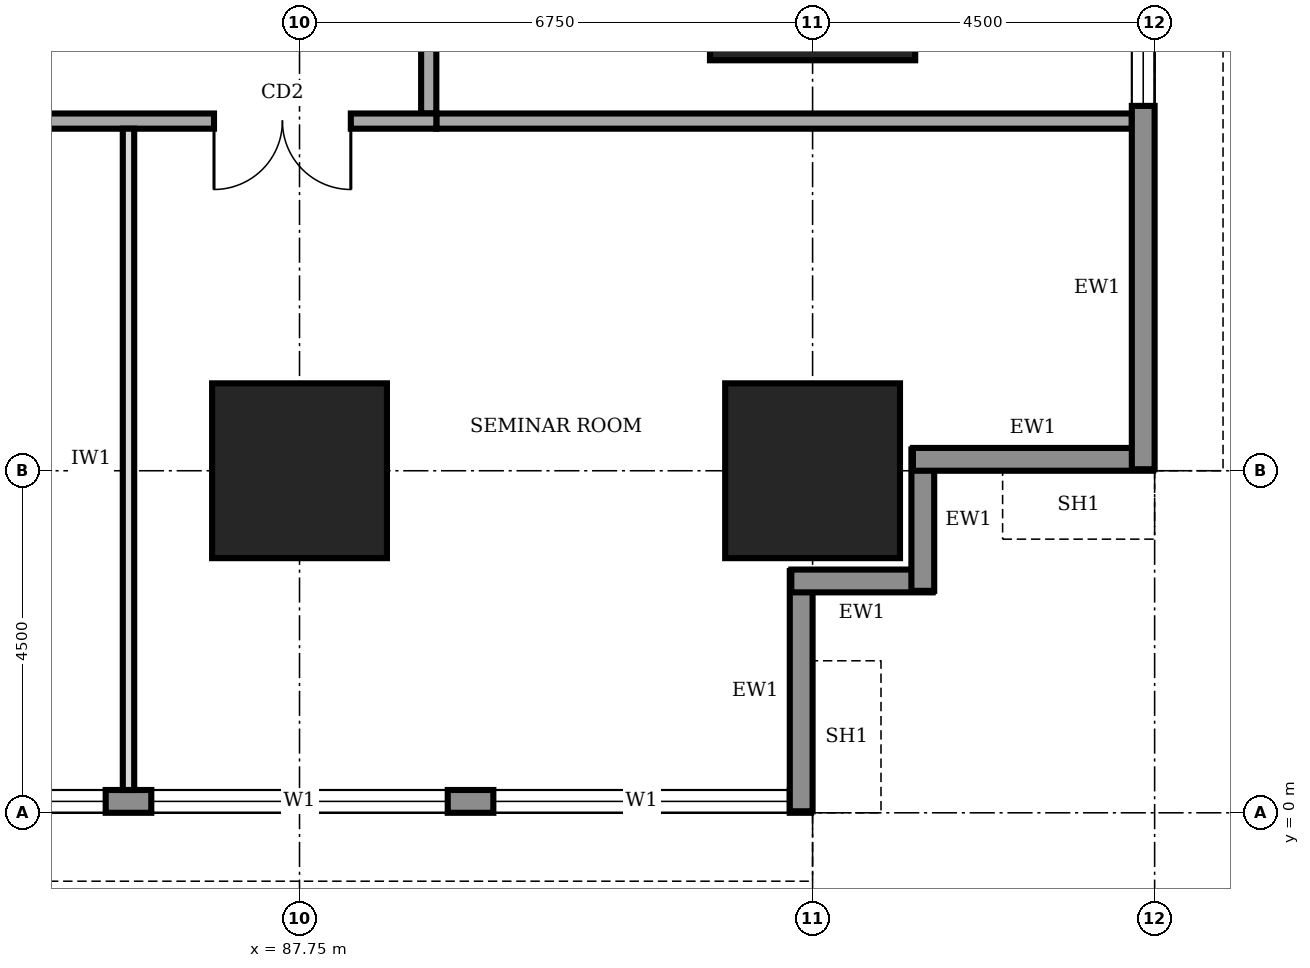
"""IFC4 building model, lengths in metres.
Left out: names, types, materials, properties, quantities, classifications, styles, units other than length and angle.
Written with IfcOpenShell. Run it as: python <this file> out.ifc"""

import sys

from ifc_helpers import new_model, si_unit, direction, frame, frame_2d, origin, origin_2d, place, context, subcontext, project, spatial, rectangle, extrude, element, fill, save


model = new_model("IFC4")
c1 = context("Model", 3, precision=1e-05, world=origin(), true_north=direction((0.0, 1.0)))
c2 = subcontext(c1, "Body", "Model", "MODEL_VIEW")
j1 = project(units=[si_unit("LENGTHUNIT", "METRE"), si_unit("PLANEANGLEUNIT", "RADIAN")], contexts=[c1])
p1 = place(None, origin())
s1 = spatial("IfcSite", under=j1, at=p1, CompositionType="ELEMENT")
p2 = place(p1, origin())
s2 = spatial("IfcBuilding", under=s1, at=p2, CompositionType="ELEMENT")
p3 = place(p2, frame((0.0, 0.0, 29.0)))
s3 = spatial("IfcBuildingStorey", under=s2, at=p3, CompositionType="ELEMENT", Elevation=29.0)
for number, where, z_axis, x_axis in (
    (1, (87.75, 4.5, 0.0), (0.0, 0.0, 1.0), (1.0, 0.0, 0.0)),
    (2, (94.5, 4.5, 0.0), (0.0, 0.0, 1.0), (1.0, 0.0, 0.0)),
):
    element("IfcColumn", number, at=place(p3, frame(where, z_axis=z_axis, x_axis=x_axis)), inside=s3, PredefinedType="COLUMN", context=c2, shape_type="SweptSolid", body=[
        extrude(rectangle(XDim=2.3, YDim=2.3, at=origin_2d()), origin(), (0.0, 0.0, 1.0), 4.0),
    ])
p4 = place(p3, frame((94.5, 11.25, 0.0), z_axis=(0.0, 0.0, 1.0), x_axis=(1.0, 0.0, 0.0)))
e3 = element("IfcColumn", 3, at=p4, inside=s3, PredefinedType="COLUMN", context=c2, shape_type="SweptSolid", body=[
    extrude(rectangle(XDim=2.7, YDim=2.7, at=origin_2d()), origin(), (0.0, 0.0, 1.0), 4.0),
])
p5 = place(p3, frame((67.52, 0.15, 0.0), z_axis=(0.0, 0.0, 1.0), x_axis=(1.0, 0.0, 0.0)))
e4 = element("IfcWall", 4, at=p5, inside=s3, PredefinedType="STANDARD", context=c2, shape_type="SweptSolid", body=[
    extrude(rectangle(XDim=26.96, YDim=0.3, at=frame_2d((13.48, 0.0))), origin(), (0.0, 0.0, 1.0), 3.75),
])
p6 = place(p5, frame((4.78, 0.0, 0.9)))
e5 = element("IfcOpeningElement", 5, at=p6, cuts=e4, PredefinedType="OPENING", context=c2, shape_type="SweptSolid", body=[
    extrude(rectangle(XDim=3.9, YDim=2.2, at=frame_2d((1.95, 1.1))), frame((0.0, 0.16, 0.0), z_axis=(0.0, -1.0, 0.0), x_axis=(1.0, 0.0, 0.0)), (0.0, 0.0, 1.0), 0.32),
])
p7 = place(p5, frame((9.28, 0.0, 0.9)))
e6 = element("IfcOpeningElement", 6, at=p7, cuts=e4, PredefinedType="OPENING", context=c2, shape_type="SweptSolid", body=[
    extrude(rectangle(XDim=3.9, YDim=2.2, at=frame_2d((1.95, 1.1))), frame((0.0, 0.16, 0.0), z_axis=(0.0, -1.0, 0.0), x_axis=(1.0, 0.0, 0.0)), (0.0, 0.0, 1.0), 0.32),
])
p8 = place(p5, frame((13.78, 0.0, 0.9)))
e7 = element("IfcOpeningElement", 7, at=p8, cuts=e4, PredefinedType="OPENING", context=c2, shape_type="SweptSolid", body=[
    extrude(rectangle(XDim=3.9, YDim=2.2, at=frame_2d((1.95, 1.1))), frame((0.0, 0.16, 0.0), z_axis=(0.0, -1.0, 0.0), x_axis=(1.0, 0.0, 0.0)), (0.0, 0.0, 1.0), 0.32),
])
p9 = place(p5, frame((18.28, 0.0, 0.9)))
e8 = element("IfcOpeningElement", 8, at=p9, cuts=e4, PredefinedType="OPENING", context=c2, shape_type="SweptSolid", body=[
    extrude(rectangle(XDim=3.9, YDim=2.2, at=frame_2d((1.95, 1.1))), frame((0.0, 0.16, 0.0), z_axis=(0.0, -1.0, 0.0), x_axis=(1.0, 0.0, 0.0)), (0.0, 0.0, 1.0), 0.32),
])
p10 = place(p5, frame((22.78, 0.0, 0.9)))
e9 = element("IfcOpeningElement", 9, at=p10, cuts=e4, PredefinedType="OPENING", context=c2, shape_type="SweptSolid", body=[
    extrude(rectangle(XDim=3.9, YDim=2.2, at=frame_2d((1.95, 1.1))), frame((0.0, 0.16, 0.0), z_axis=(0.0, -1.0, 0.0), x_axis=(1.0, 0.0, 0.0)), (0.0, 0.0, 1.0), 0.32),
])
p11 = place(p3, frame((94.35, 0.02, 0.0), z_axis=(0.0, 0.0, 1.0), x_axis=(0.0, 1.0, 0.0)))
e10 = element("IfcWall", 10, at=p11, inside=s3, PredefinedType="STANDARD", context=c2, shape_type="SweptSolid", body=[
    extrude(rectangle(XDim=3.16, YDim=0.3, at=frame_2d((1.58, 0.0))), origin(), (0.0, 0.0, 1.0), 2.85),
])
for number, where, z_axis, x_axis in (
    (11, (94.22, 3.05, 0.0), (0.0, 0.0, 1.0), (1.0, 0.0, 0.0)),
    (12, (95.95, 2.92, 0.0), (0.0, 0.0, 1.0), (0.0, 1.0, 0.0)),
):
    element("IfcWall", number, at=place(p3, frame(where, z_axis=z_axis, x_axis=x_axis)), inside=s3, PredefinedType="STANDARD", context=c2, shape_type="SweptSolid", body=[
        extrude(rectangle(XDim=1.86, YDim=0.3, at=frame_2d((0.93, 0.0))), origin(), (0.0, 0.0, 1.0), 3.75),
    ])
p12 = place(p3, frame((95.82, 4.65, 0.0), z_axis=(0.0, 0.0, 1.0), x_axis=(1.0, 0.0, 0.0)))
e13 = element("IfcWall", 13, at=p12, inside=s3, PredefinedType="STANDARD", context=c2, shape_type="SweptSolid", body=[
    extrude(rectangle(XDim=3.16, YDim=0.3, at=frame_2d((1.58, 0.0))), origin(), (0.0, 0.0, 1.0), 2.85),
])
p13 = place(p3, frame((98.85, 4.52, 0.0), z_axis=(0.0, 0.0, 1.0), x_axis=(0.0, 1.0, 0.0)))
e14 = element("IfcWall", 14, at=p13, inside=s3, PredefinedType="STANDARD", context=c2, shape_type="SweptSolid", body=[
    extrude(rectangle(XDim=31.46, YDim=0.3, at=frame_2d((15.73, 0.0))), origin(), (0.0, 0.0, 1.0), 3.75),
])
p14 = place(p13, frame((4.78, 0.0, 0.9)))
e15 = element("IfcOpeningElement", 15, at=p14, cuts=e14, PredefinedType="OPENING", context=c2, shape_type="SweptSolid", body=[
    extrude(rectangle(XDim=3.9, YDim=2.2, at=frame_2d((1.95, 1.1))), frame((0.0, 0.16, 0.0), z_axis=(0.0, -1.0, 0.0), x_axis=(1.0, 0.0, 0.0)), (0.0, 0.0, 1.0), 0.32),
])
p15 = place(p13, frame((9.28, 0.0, 0.9)))
e16 = element("IfcOpeningElement", 16, at=p15, cuts=e14, PredefinedType="OPENING", context=c2, shape_type="SweptSolid", body=[
    extrude(rectangle(XDim=3.9, YDim=2.2, at=frame_2d((1.95, 1.1))), frame((0.0, 0.16, 0.0), z_axis=(0.0, -1.0, 0.0), x_axis=(1.0, 0.0, 0.0)), (0.0, 0.0, 1.0), 0.32),
])
p16 = place(p13, frame((13.78, 0.0, 0.9)))
e17 = element("IfcOpeningElement", 17, at=p16, cuts=e14, PredefinedType="OPENING", context=c2, shape_type="SweptSolid", body=[
    extrude(rectangle(XDim=3.9, YDim=2.2, at=frame_2d((1.95, 1.1))), frame((0.0, 0.16, 0.0), z_axis=(0.0, -1.0, 0.0), x_axis=(1.0, 0.0, 0.0)), (0.0, 0.0, 1.0), 0.32),
])
p17 = place(p13, frame((18.28, 0.0, 0.9)))
e18 = element("IfcOpeningElement", 18, at=p17, cuts=e14, PredefinedType="OPENING", context=c2, shape_type="SweptSolid", body=[
    extrude(rectangle(XDim=3.9, YDim=2.2, at=frame_2d((1.95, 1.1))), frame((0.0, 0.16, 0.0), z_axis=(0.0, -1.0, 0.0), x_axis=(1.0, 0.0, 0.0)), (0.0, 0.0, 1.0), 0.32),
])
p18 = place(p13, frame((22.78, 0.0, 0.9)))
e19 = element("IfcOpeningElement", 19, at=p18, cuts=e14, PredefinedType="OPENING", context=c2, shape_type="SweptSolid", body=[
    extrude(rectangle(XDim=3.9, YDim=2.2, at=frame_2d((1.95, 1.1))), frame((0.0, 0.16, 0.0), z_axis=(0.0, -1.0, 0.0), x_axis=(1.0, 0.0, 0.0)), (0.0, 0.0, 1.0), 0.32),
])
p19 = place(p13, frame((27.28, 0.0, 0.9)))
e20 = element("IfcOpeningElement", 20, at=p19, cuts=e14, PredefinedType="OPENING", context=c2, shape_type="SweptSolid", body=[
    extrude(rectangle(XDim=3.9, YDim=2.2, at=frame_2d((1.95, 1.1))), frame((0.0, 0.16, 0.0), z_axis=(0.0, -1.0, 0.0), x_axis=(1.0, 0.0, 0.0)), (0.0, 0.0, 1.0), 0.32),
])
p20 = place(p3, frame((72.65, 9.1, 0.0), z_axis=(0.0, 0.0, 1.0), x_axis=(1.0, 0.0, 0.0)))
e21 = element("IfcWall", 21, at=p20, inside=s3, PredefinedType="SOLIDWALL", context=c2, shape_type="SweptSolid", body=[
    extrude(rectangle(XDim=16.9, YDim=0.2, at=frame_2d((8.45, 0.0))), origin(), (0.0, 0.0, 1.0), 3.75),
])
p21 = place(p20, frame((0.925, 0.0, 0.0)))
e22 = element("IfcOpeningElement", 22, at=p21, cuts=e21, PredefinedType="OPENING", context=c2, shape_type="SweptSolid", body=[
    extrude(rectangle(XDim=1.8, YDim=2.1, at=frame_2d((0.9, 1.05))), frame((0.0, 0.11, 0.0), z_axis=(0.0, -1.0, 0.0), x_axis=(1.0, 0.0, 0.0)), (0.0, 0.0, 1.0), 0.22),
])
p22 = place(p20, frame((7.85, 0.0, 0.0)))
e23 = element("IfcOpeningElement", 23, at=p22, cuts=e21, PredefinedType="OPENING", context=c2, shape_type="SweptSolid", body=[
    extrude(rectangle(XDim=1.0, YDim=2.1, at=frame_2d((0.5, 1.05))), frame((0.0, 0.11, 0.0), z_axis=(0.0, -1.0, 0.0), x_axis=(1.0, 0.0, 0.0)), (0.0, 0.0, 1.0), 0.22),
])
p23 = place(p20, frame((13.975, 0.0, 0.0)))
e24 = element("IfcOpeningElement", 24, at=p23, cuts=e21, PredefinedType="OPENING", context=c2, shape_type="SweptSolid", body=[
    extrude(rectangle(XDim=1.8, YDim=2.1, at=frame_2d((0.9, 1.05))), frame((0.0, 0.11, 0.0), z_axis=(0.0, -1.0, 0.0), x_axis=(1.0, 0.0, 0.0)), (0.0, 0.0, 1.0), 0.22),
])
p24 = place(p3, frame((89.45, 9.2, 0.0), z_axis=(0.0, 0.0, 1.0), x_axis=(0.0, 1.0, 0.0)))
e25 = element("IfcWall", 25, at=p24, inside=s3, PredefinedType="SOLIDWALL", context=c2, shape_type="SweptSolid", body=[
    extrude(rectangle(XDim=23.8, YDim=0.2, at=frame_2d((11.9, 0.0))), origin(), (0.0, 0.0, 1.0), 3.75),
])
p25 = place(p24, frame((1.55, 0.0, 0.0)))
e26 = element("IfcOpeningElement", 26, at=p25, cuts=e25, PredefinedType="OPENING", context=c2, shape_type="SweptSolid", body=[
    extrude(rectangle(XDim=1.0, YDim=2.1, at=frame_2d((0.5, 1.05))), frame((0.0, 0.11, 0.0), z_axis=(0.0, -1.0, 0.0), x_axis=(1.0, 0.0, 0.0)), (0.0, 0.0, 1.0), 0.22),
])
p26 = place(p24, frame((5.75, 0.0, 0.0)))
e27 = element("IfcOpeningElement", 27, at=p26, cuts=e25, PredefinedType="OPENING", context=c2, shape_type="SweptSolid", body=[
    extrude(rectangle(XDim=0.9, YDim=2.1, at=frame_2d((0.45, 1.05))), frame((0.0, 0.11, 0.0), z_axis=(0.0, -1.0, 0.0), x_axis=(1.0, 0.0, 0.0)), (0.0, 0.0, 1.0), 0.22),
])
p27 = place(p24, frame((8.75, 0.0, 0.0)))
e28 = element("IfcOpeningElement", 28, at=p27, cuts=e25, PredefinedType="OPENING", context=c2, shape_type="SweptSolid", body=[
    extrude(rectangle(XDim=0.9, YDim=2.1, at=frame_2d((0.45, 1.05))), frame((0.0, 0.11, 0.0), z_axis=(0.0, -1.0, 0.0), x_axis=(1.0, 0.0, 0.0)), (0.0, 0.0, 1.0), 0.22),
])
p28 = place(p24, frame((13.6, 0.0, 0.0)))
e29 = element("IfcOpeningElement", 29, at=p28, cuts=e25, PredefinedType="OPENING", context=c2, shape_type="SweptSolid", body=[
    extrude(rectangle(XDim=0.9, YDim=2.1, at=frame_2d((0.45, 1.05))), frame((0.0, 0.11, 0.0), z_axis=(0.0, -1.0, 0.0), x_axis=(1.0, 0.0, 0.0)), (0.0, 0.0, 1.0), 0.22),
])
p29 = place(p24, frame((16.3, 0.0, 0.0)))
e30 = element("IfcOpeningElement", 30, at=p29, cuts=e25, PredefinedType="OPENING", context=c2, shape_type="SweptSolid", body=[
    extrude(rectangle(XDim=1.0, YDim=2.1, at=frame_2d((0.5, 1.05))), frame((0.0, 0.11, 0.0), z_axis=(0.0, -1.0, 0.0), x_axis=(1.0, 0.0, 0.0)), (0.0, 0.0, 1.0), 0.22),
])
p30 = place(p24, frame((10.8, 0.0, 0.0)))
e31 = element("IfcOpeningElement", 31, at=p30, cuts=e25, PredefinedType="OPENING", context=c2, shape_type="SweptSolid", body=[
    extrude(rectangle(XDim=1.0, YDim=2.1, at=frame_2d((0.5, 1.05))), frame((0.0, 0.11, 0.0), z_axis=(0.0, -1.0, 0.0), x_axis=(1.0, 0.0, 0.0)), (0.0, 0.0, 1.0), 0.22),
])
p31 = place(p24, frame((20.3, 0.0, 0.0)))
e32 = element("IfcOpeningElement", 32, at=p31, cuts=e25, PredefinedType="OPENING", context=c2, shape_type="SweptSolid", body=[
    extrude(rectangle(XDim=1.0, YDim=2.1, at=frame_2d((0.5, 1.05))), frame((0.0, 0.11, 0.0), z_axis=(0.0, -1.0, 0.0), x_axis=(1.0, 0.0, 0.0)), (0.0, 0.0, 1.0), 0.22),
])
p32 = place(p3, frame((89.55, 9.1, 0.0), z_axis=(0.0, 0.0, 1.0), x_axis=(1.0, 0.0, 0.0)))
e33 = element("IfcWall", 33, at=p32, inside=s3, PredefinedType="SOLIDWALL", context=c2, shape_type="SweptSolid", body=[
    extrude(rectangle(XDim=9.15, YDim=0.2, at=frame_2d((4.575, 0.0))), origin(), (0.0, 0.0, 1.0), 3.75),
])
p33 = place(p3, frame((85.5, 0.3, 0.0), z_axis=(0.0, 0.0, 1.0), x_axis=(0.0, 1.0, 0.0)))
e34 = element("IfcWall", 34, at=p33, inside=s3, PredefinedType="PARTITIONING", context=c2, shape_type="SweptSolid", body=[
    extrude(rectangle(XDim=8.7, YDim=0.15, at=frame_2d((4.35, 0.0))), origin(), (0.0, 0.0, 1.0), 3.75),
])
p34 = place(p8, origin())
e35 = element("IfcWindow", 35, at=p34, inside=s3, PartitioningType="SINGLE_PANEL", PredefinedType="WINDOW", context=c2, shape_type="SweptSolid", body=[
    extrude(rectangle(XDim=3.9, YDim=2.2, at=frame_2d((1.95, 1.1))), frame((0.0, 0.03, 0.0), z_axis=(0.0, -1.0, 0.0), x_axis=(1.0, 0.0, 0.0)), (0.0, 0.0, 1.0), 0.06),
])
fill(e7, e35)
p35 = place(p9, origin())
e36 = element("IfcWindow", 36, at=p35, inside=s3, PartitioningType="SINGLE_PANEL", PredefinedType="WINDOW", context=c2, shape_type="SweptSolid", body=[
    extrude(rectangle(XDim=3.9, YDim=2.2, at=frame_2d((1.95, 1.1))), frame((0.0, 0.03, 0.0), z_axis=(0.0, -1.0, 0.0), x_axis=(1.0, 0.0, 0.0)), (0.0, 0.0, 1.0), 0.06),
])
fill(e8, e36)
p36 = place(p10, origin())
e37 = element("IfcWindow", 37, at=p36, inside=s3, PartitioningType="SINGLE_PANEL", PredefinedType="WINDOW", context=c2, shape_type="SweptSolid", body=[
    extrude(rectangle(XDim=3.9, YDim=2.2, at=frame_2d((1.95, 1.1))), frame((0.0, 0.03, 0.0), z_axis=(0.0, -1.0, 0.0), x_axis=(1.0, 0.0, 0.0)), (0.0, 0.0, 1.0), 0.06),
])
fill(e9, e37)
p37 = place(p14, origin())
e38 = element("IfcWindow", 38, at=p37, inside=s3, PartitioningType="SINGLE_PANEL", PredefinedType="WINDOW", context=c2, shape_type="SweptSolid", body=[
    extrude(rectangle(XDim=3.9, YDim=2.2, at=frame_2d((1.95, 1.1))), frame((0.0, 0.03, 0.0), z_axis=(0.0, -1.0, 0.0), x_axis=(1.0, 0.0, 0.0)), (0.0, 0.0, 1.0), 0.06),
])
fill(e15, e38)
p38 = place(p23, frame((1.8, 0.0, 0.0), z_axis=(0.0, 0.0, 1.0), x_axis=(-1.0, 0.0, 0.0)))
e39 = element("IfcDoor", 39, at=p38, inside=s3, OperationType="DOUBLE_DOOR_SINGLE_SWING", PredefinedType="DOOR", context=c2, shape_type="SweptSolid", body=[
    extrude(rectangle(XDim=1.8, YDim=2.1, at=frame_2d((0.9, 1.05))), frame((0.0, 0.025, 0.0), z_axis=(0.0, -1.0, 0.0), x_axis=(1.0, 0.0, 0.0)), (0.0, 0.0, 1.0), 0.05),
])
fill(e24, e39)
save(model, sys.argv[1])
